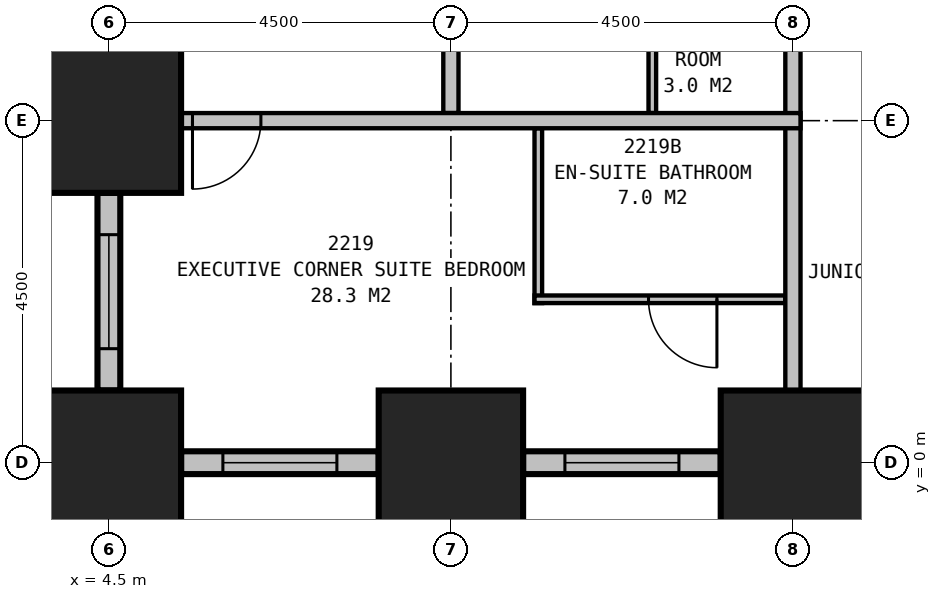
"""IFC4 building model, lengths in metres.
Left out: names, types, materials, properties, quantities, classifications, styles, units other than length and angle.
Written with IfcOpenShell. Run it as: python <this file> out.ifc"""

import sys

from ifc_helpers import new_model, si_unit, direction, frame, frame_2d, origin, origin_2d, place, context, subcontext, project, spatial, rectangle, extrude, element, fill, save


model = new_model("IFC4")
c1 = context("Model", 3, precision=1e-05, world=origin(), true_north=direction((0.0, 1.0)))
c2 = subcontext(c1, "Body", "Model", "MODEL_VIEW")
j1 = project(units=[si_unit("LENGTHUNIT", "METRE"), si_unit("PLANEANGLEUNIT", "RADIAN")], contexts=[c1])
p1 = place(None, origin())
s1 = spatial("IfcSite", under=j1, at=p1, CompositionType="ELEMENT")
p2 = place(p1, origin())
s2 = spatial("IfcBuilding", under=s1, at=p2, CompositionType="ELEMENT")
p3 = place(p2, frame((0.0, 0.0, 89.9)))
s3 = spatial("IfcBuildingStorey", under=s2, at=p3, CompositionType="ELEMENT", Elevation=89.9)
for number, where, z_axis, x_axis in (
    (1, (4.5, 4.5, 0.0), (0.0, 0.0, 1.0), (1.0, 0.0, 0.0)),
    (2, (4.5, 0.0, 0.0), (0.0, 0.0, 1.0), (1.0, 0.0, 0.0)),
    (3, (9.0, 0.0, 0.0), (0.0, 0.0, 1.0), (1.0, 0.0, 0.0)),
    (4, (13.5, 0.0, 0.0), (0.0, 0.0, 1.0), (1.0, 0.0, 0.0)),
):
    element("IfcColumn", number, at=place(p3, frame(where, z_axis=z_axis, x_axis=x_axis)), inside=s3, PredefinedType="COLUMN", context=c2, shape_type="SweptSolid", body=[
        extrude(rectangle(XDim=1.9, YDim=1.9, at=origin_2d()), origin(), (0.0, 0.0, 1.0), 3.5),
    ])
p4 = place(p3, frame((4.5, 3.55, 0.0), z_axis=(0.0, 0.0, 1.0), x_axis=(0.0, -1.0, 0.0)))
e5 = element("IfcWall", 5, at=p4, inside=s3, PredefinedType="STANDARD", context=c2, shape_type="SweptSolid", body=[
    extrude(rectangle(XDim=2.6, YDim=0.3, at=frame_2d((1.3, 0.0))), origin(), (0.0, 0.0, 1.0), 2.15),
])
p5 = place(p4, frame((0.55, 0.0, 0.5)))
e6 = element("IfcOpeningElement", 6, at=p5, cuts=e5, PredefinedType="OPENING", context=c2, shape_type="SweptSolid", body=[
    extrude(rectangle(XDim=1.5, YDim=1.5, at=frame_2d((0.75, 0.75))), frame((0.0, 0.16, 0.0), z_axis=(0.0, -1.0, 0.0), x_axis=(1.0, 0.0, 0.0)), (0.0, 0.0, 1.0), 0.32),
])
p6 = place(p3, frame((5.45, 0.0, 0.0), z_axis=(0.0, 0.0, 1.0), x_axis=(1.0, 0.0, 0.0)))
e7 = element("IfcWall", 7, at=p6, inside=s3, PredefinedType="STANDARD", context=c2, shape_type="SweptSolid", body=[
    extrude(rectangle(XDim=2.6, YDim=0.3, at=frame_2d((1.3, 0.0))), origin(), (0.0, 0.0, 1.0), 2.15),
])
p7 = place(p6, frame((0.55, 0.0, 0.5)))
e8 = element("IfcOpeningElement", 8, at=p7, cuts=e7, PredefinedType="OPENING", context=c2, shape_type="SweptSolid", body=[
    extrude(rectangle(XDim=1.5, YDim=1.5, at=frame_2d((0.75, 0.75))), frame((0.0, 0.16, 0.0), z_axis=(0.0, -1.0, 0.0), x_axis=(1.0, 0.0, 0.0)), (0.0, 0.0, 1.0), 0.32),
])
p8 = place(p3, frame((9.95, 0.0, 0.0), z_axis=(0.0, 0.0, 1.0), x_axis=(1.0, 0.0, 0.0)))
e9 = element("IfcWall", 9, at=p8, inside=s3, PredefinedType="STANDARD", context=c2, shape_type="SweptSolid", body=[
    extrude(rectangle(XDim=2.6, YDim=0.3, at=frame_2d((1.3, 0.0))), origin(), (0.0, 0.0, 1.0), 2.15),
])
p9 = place(p8, frame((0.55, 0.0, 0.5)))
e10 = element("IfcOpeningElement", 10, at=p9, cuts=e9, PredefinedType="OPENING", context=c2, shape_type="SweptSolid", body=[
    extrude(rectangle(XDim=1.5, YDim=1.5, at=frame_2d((0.75, 0.75))), frame((0.0, 0.16, 0.0), z_axis=(0.0, -1.0, 0.0), x_axis=(1.0, 0.0, 0.0)), (0.0, 0.0, 1.0), 0.32),
])
p10 = place(p3, frame((13.5, 10.6, 0.0), z_axis=(0.0, 0.0, 1.0), x_axis=(0.0, -1.0, 0.0)))
e11 = element("IfcWall", 11, at=p10, inside=s3, PredefinedType="PARTITIONING", context=c2, shape_type="SweptSolid", body=[
    extrude(rectangle(XDim=10.6, YDim=0.2, at=frame_2d((5.3, 0.0))), origin(), (0.0, 0.0, 1.0), 2.25),
])
p11 = place(p3, frame((13.6, 4.5, 0.0), z_axis=(0.0, 0.0, 1.0), x_axis=(-1.0, 0.0, 0.0)))
e12 = element("IfcWall", 12, at=p11, inside=s3, PredefinedType="PARTITIONING", context=c2, shape_type="SweptSolid", body=[
    extrude(rectangle(XDim=9.1, YDim=0.2, at=frame_2d((4.55, 0.0))), origin(), (0.0, 0.0, 1.0), 3.25),
])
p12 = place(p11, frame((7.1, 0.0, 0.0)))
e13 = element("IfcOpeningElement", 13, at=p12, cuts=e12, PredefinedType="OPENING", context=c2, shape_type="SweptSolid", body=[
    extrude(rectangle(XDim=0.9, YDim=2.1, at=frame_2d((0.45, 1.05))), frame((0.0, 0.11, 0.0), z_axis=(0.0, -1.0, 0.0), x_axis=(1.0, 0.0, 0.0)), (0.0, 0.0, 1.0), 0.22),
])
p13 = place(p3, frame((9.0, 4.6, 0.0), z_axis=(0.0, 0.0, 1.0), x_axis=(0.0, 1.0, 0.0)))
e14 = element("IfcWall", 14, at=p13, inside=s3, PredefinedType="PARTITIONING", context=c2, shape_type="SweptSolid", body=[
    extrude(rectangle(XDim=8.8, YDim=0.2, at=frame_2d((4.4, 0.0))), origin(), (0.0, 0.0, 1.0), 2.25),
])
p14 = place(p13, frame((4.05, 0.0, 0.0)))
e15 = element("IfcOpeningElement", 15, at=p14, cuts=e14, PredefinedType="OPENING", context=c2, shape_type="SweptSolid", body=[
    extrude(rectangle(XDim=0.9, YDim=2.1, at=frame_2d((0.45, 1.05))), frame((0.0, 0.11, 0.0), z_axis=(0.0, -1.0, 0.0), x_axis=(1.0, 0.0, 0.0)), (0.0, 0.0, 1.0), 0.22),
])
p15 = place(p3, frame((11.65, 4.6, 0.0), z_axis=(0.0, 0.0, 1.0), x_axis=(0.0, 1.0, 0.0)))
e16 = element("IfcWall", 16, at=p15, inside=s3, PredefinedType="PLUMBINGWALL", context=c2, shape_type="SweptSolid", body=[
    extrude(rectangle(XDim=2.0, YDim=0.1, at=frame_2d((1.0, 0.0))), origin(), (0.0, 0.0, 1.0), 3.25),
])
p16 = place(p3, frame((10.15, 4.4, 0.0), z_axis=(0.0, 0.0, 1.0), x_axis=(0.0, -1.0, 0.0)))
e17 = element("IfcWall", 17, at=p16, inside=s3, PredefinedType="PLUMBINGWALL", context=c2, shape_type="SweptSolid", body=[
    extrude(rectangle(XDim=2.3, YDim=0.1, at=frame_2d((1.15, 0.0))), origin(), (0.0, 0.0, 1.0), 3.25),
])
p17 = place(p3, frame((13.4, 2.15, 0.0), z_axis=(0.0, 0.0, 1.0), x_axis=(-1.0, 0.0, 0.0)))
e18 = element("IfcWall", 18, at=p17, inside=s3, PredefinedType="PLUMBINGWALL", context=c2, shape_type="SweptSolid", body=[
    extrude(rectangle(XDim=3.3, YDim=0.1, at=frame_2d((1.65, 0.0))), origin(), (0.0, 0.0, 1.0), 3.25),
])
p18 = place(p17, frame((0.9, 0.0, 0.0)))
e19 = element("IfcOpeningElement", 19, at=p18, cuts=e18, PredefinedType="OPENING", context=c2, shape_type="SweptSolid", body=[
    extrude(rectangle(XDim=0.9, YDim=2.1, at=frame_2d((0.45, 1.05))), frame((0.0, 0.06, 0.0), z_axis=(0.0, -1.0, 0.0), x_axis=(1.0, 0.0, 0.0)), (0.0, 0.0, 1.0), 0.12),
])
p19 = place(p5, origin())
e20 = element("IfcWindow", 20, at=p19, inside=s3, PartitioningType="SINGLE_PANEL", PredefinedType="WINDOW", context=c2, shape_type="SweptSolid", body=[
    extrude(rectangle(XDim=1.5, YDim=1.5, at=frame_2d((0.75, 0.75))), frame((0.0, 0.03, 0.0), z_axis=(0.0, -1.0, 0.0), x_axis=(1.0, 0.0, 0.0)), (0.0, 0.0, 1.0), 0.06),
])
fill(e6, e20)
p20 = place(p7, origin())
e21 = element("IfcWindow", 21, at=p20, inside=s3, PartitioningType="SINGLE_PANEL", PredefinedType="WINDOW", context=c2, shape_type="SweptSolid", body=[
    extrude(rectangle(XDim=1.5, YDim=1.5, at=frame_2d((0.75, 0.75))), frame((0.0, 0.03, 0.0), z_axis=(0.0, -1.0, 0.0), x_axis=(1.0, 0.0, 0.0)), (0.0, 0.0, 1.0), 0.06),
])
fill(e8, e21)
p21 = place(p9, origin())
e22 = element("IfcWindow", 22, at=p21, inside=s3, PartitioningType="SINGLE_PANEL", PredefinedType="WINDOW", context=c2, shape_type="SweptSolid", body=[
    extrude(rectangle(XDim=1.5, YDim=1.5, at=frame_2d((0.75, 0.75))), frame((0.0, 0.03, 0.0), z_axis=(0.0, -1.0, 0.0), x_axis=(1.0, 0.0, 0.0)), (0.0, 0.0, 1.0), 0.06),
])
fill(e10, e22)
p22 = place(p12, origin())
e23 = element("IfcDoor", 23, at=p22, inside=s3, OperationType="SINGLE_SWING_RIGHT", PredefinedType="DOOR", context=c2, shape_type="SweptSolid", body=[
    extrude(rectangle(XDim=0.9, YDim=2.1, at=frame_2d((0.45, 1.05))), frame((0.0, 0.025, 0.0), z_axis=(0.0, -1.0, 0.0), x_axis=(1.0, 0.0, 0.0)), (0.0, 0.0, 1.0), 0.05),
])
fill(e13, e23)
p23 = place(p18, origin())
e24 = element("IfcDoor", 24, at=p23, inside=s3, OperationType="SINGLE_SWING_LEFT", PredefinedType="DOOR", context=c2, shape_type="SweptSolid", body=[
    extrude(rectangle(XDim=0.9, YDim=2.1, at=frame_2d((0.45, 1.05))), frame((0.0, 0.025, 0.0), z_axis=(0.0, -1.0, 0.0), x_axis=(1.0, 0.0, 0.0)), (0.0, 0.0, 1.0), 0.05),
])
fill(e19, e24)
save(model, sys.argv[1])
